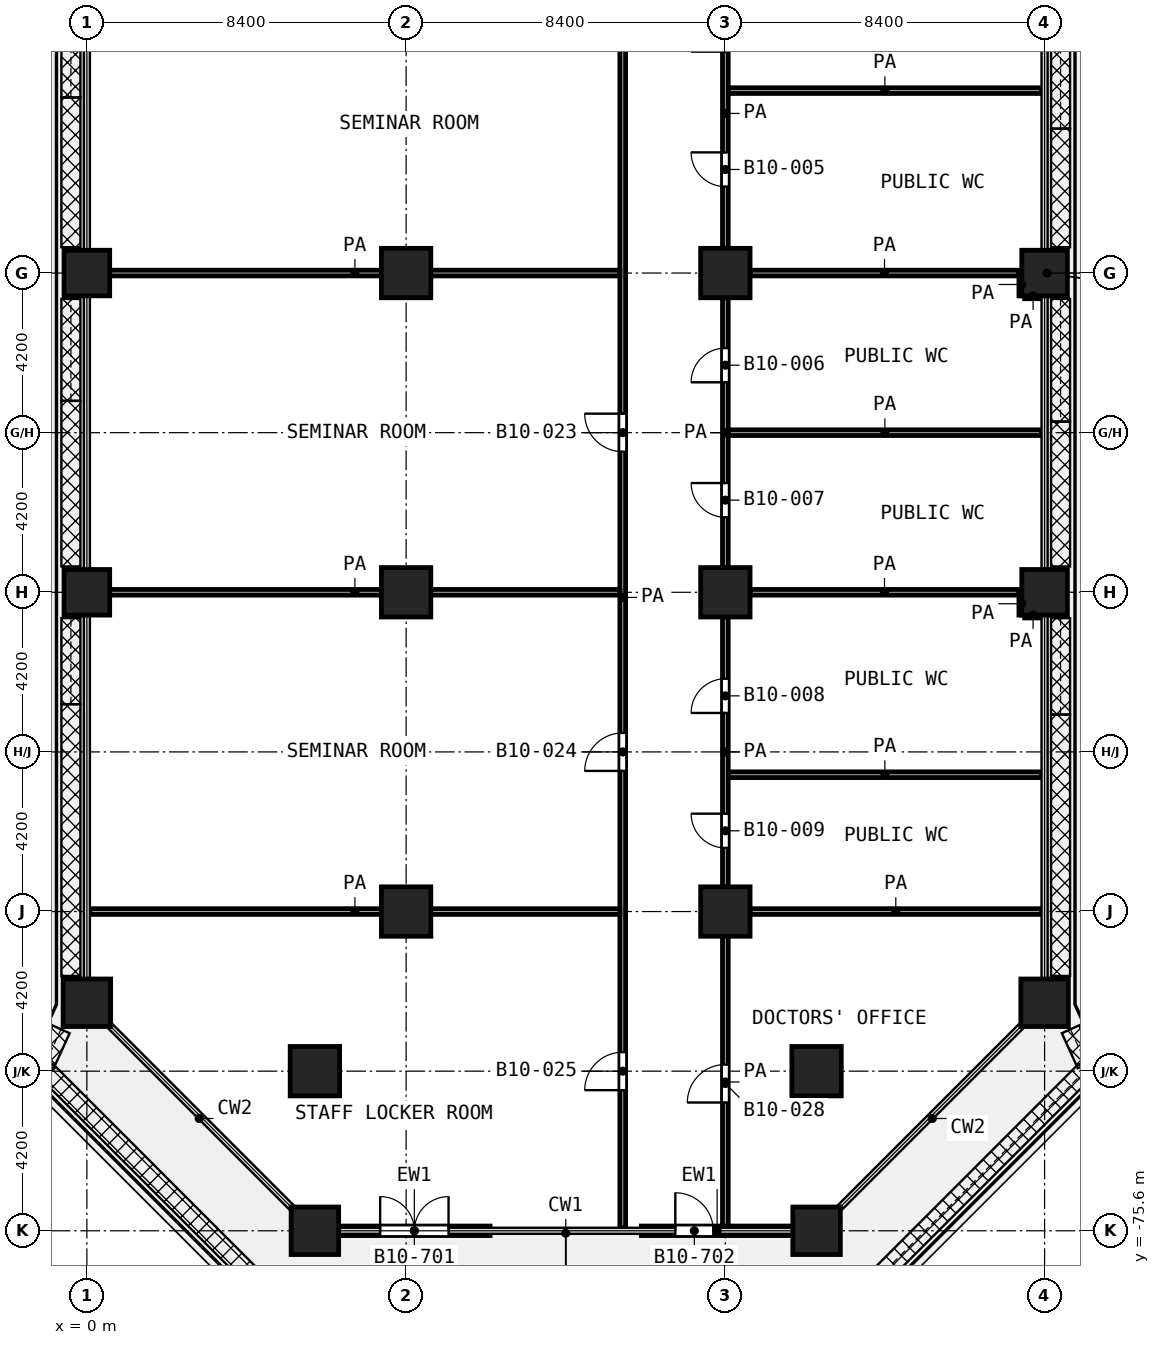
"""IFC4 building model, lengths in metres.
Left out: names, types, materials, properties, quantities, classifications, styles, units other than length and angle.
Written with IfcOpenShell. Run it as: python <this file> out.ifc"""

import sys

from ifc_helpers import new_model, si_unit, direction, frame, frame_2d, origin, origin_2d, place, context, subcontext, project, spatial, rectangle, extrude, element, fill, save


model = new_model("IFC4")
c1 = context("Model", 3, precision=1e-05, world=origin(), true_north=direction((0.0, 1.0)))
c2 = subcontext(c1, "Body", "Model", "MODEL_VIEW")
j1 = project(units=[si_unit("LENGTHUNIT", "METRE"), si_unit("PLANEANGLEUNIT", "RADIAN")], contexts=[c1])
p1 = place(None, origin())
s1 = spatial("IfcSite", under=j1, at=p1, CompositionType="ELEMENT")
p2 = place(p1, origin())
s2 = spatial("IfcBuilding", under=s1, at=p2, CompositionType="ELEMENT")
p3 = place(p2, frame((0.0, 0.0, 47.6)))
s3 = spatial("IfcBuildingStorey", under=s2, at=p3, CompositionType="ELEMENT", Elevation=47.6)
p4 = place(p3, frame((0.0, -50.4, 0.0), z_axis=(0.0, 0.0, 1.0), x_axis=(1.0, 0.0, 0.0)))
e1 = element("IfcColumn", 1, at=p4, inside=s3, PredefinedType="COLUMN", context=c2, shape_type="SweptSolid", body=[
    extrude(rectangle(XDim=1.2, YDim=1.2, at=origin_2d()), origin(), (0.0, 0.0, 1.0), 4.2),
])
for number, where, z_axis, x_axis in (
    (2, (8.4, -50.4, 0.0), (0.0, 0.0, 1.0), (1.0, 0.0, 0.0)),
    (3, (16.8, -50.4, 0.0), (0.0, 0.0, 1.0), (1.0, 0.0, 0.0)),
):
    element("IfcColumn", number, at=place(p3, frame(where, z_axis=z_axis, x_axis=x_axis)), inside=s3, PredefinedType="COLUMN", context=c2, shape_type="SweptSolid", body=[
        extrude(rectangle(XDim=1.3, YDim=1.3, at=origin_2d()), origin(), (0.0, 0.0, 1.0), 4.2),
    ])
for number, where, z_axis, x_axis in (
    (4, (25.2, -50.4, 0.0), (0.0, 0.0, 1.0), (1.0, 0.0, 0.0)),
    (5, (0.0, -58.8, 0.0), (0.0, 0.0, 1.0), (1.0, 0.0, 0.0)),
):
    element("IfcColumn", number, at=place(p3, frame(where, z_axis=z_axis, x_axis=x_axis)), inside=s3, PredefinedType="COLUMN", context=c2, shape_type="SweptSolid", body=[
        extrude(rectangle(XDim=1.2, YDim=1.2, at=origin_2d()), origin(), (0.0, 0.0, 1.0), 4.2),
    ])
for number, where, z_axis, x_axis in (
    (6, (8.4, -58.8, 0.0), (0.0, 0.0, 1.0), (1.0, 0.0, 0.0)),
    (7, (16.8, -58.8, 0.0), (0.0, 0.0, 1.0), (1.0, 0.0, 0.0)),
):
    element("IfcColumn", number, at=place(p3, frame(where, z_axis=z_axis, x_axis=x_axis)), inside=s3, PredefinedType="COLUMN", context=c2, shape_type="SweptSolid", body=[
        extrude(rectangle(XDim=1.3, YDim=1.3, at=origin_2d()), origin(), (0.0, 0.0, 1.0), 4.2),
    ])
p5 = place(p3, frame((25.2, -58.8, 0.0), z_axis=(0.0, 0.0, 1.0), x_axis=(1.0, 0.0, 0.0)))
e8 = element("IfcColumn", 8, at=p5, inside=s3, PredefinedType="COLUMN", context=c2, shape_type="SweptSolid", body=[
    extrude(rectangle(XDim=1.2, YDim=1.2, at=origin_2d()), origin(), (0.0, 0.0, 1.0), 4.2),
])
for number, where, z_axis, x_axis in (
    (9, (8.4, -67.2, 0.0), (0.0, 0.0, 1.0), (1.0, 0.0, 0.0)),
    (10, (16.8, -67.2, 0.0), (0.0, 0.0, 1.0), (1.0, 0.0, 0.0)),
):
    element("IfcColumn", number, at=place(p3, frame(where, z_axis=z_axis, x_axis=x_axis)), inside=s3, PredefinedType="COLUMN", context=c2, shape_type="SweptSolid", body=[
        extrude(rectangle(XDim=1.3, YDim=1.3, at=origin_2d()), origin(), (0.0, 0.0, 1.0), 4.2),
    ])
for number, where, z_axis, x_axis in (
    (11, (0.0, -69.6, 0.0), (0.0, 0.0, 1.0), (1.0, 0.0, 0.0)),
    (12, (25.2, -69.6, 0.0), (0.0, 0.0, 1.0), (1.0, 0.0, 0.0)),
):
    element("IfcColumn", number, at=place(p3, frame(where, z_axis=z_axis, x_axis=x_axis)), inside=s3, PredefinedType="COLUMN", context=c2, shape_type="SweptSolid", body=[
        extrude(rectangle(XDim=1.25, YDim=1.25, at=origin_2d()), origin(), (0.0, 0.0, 1.0), 4.2),
    ])
for number, where, z_axis, x_axis in (
    (13, (6.0, -71.4, 0.0), (0.0, 0.0, 1.0), (1.0, 0.0, 0.0)),
    (14, (19.2, -71.4, 0.0), (0.0, 0.0, 1.0), (1.0, 0.0, 0.0)),
):
    element("IfcColumn", number, at=place(p3, frame(where, z_axis=z_axis, x_axis=x_axis)), inside=s3, PredefinedType="COLUMN", context=c2, shape_type="SweptSolid", body=[
        extrude(rectangle(XDim=1.3, YDim=1.3, at=origin_2d()), origin(), (0.0, 0.0, 1.0), 4.2),
    ])
for number, where, z_axis, x_axis in (
    (15, (6.0, -75.6, 0.0), (0.0, 0.0, 1.0), (1.0, 0.0, 0.0)),
    (16, (19.2, -75.6, 0.0), (0.0, 0.0, 1.0), (1.0, 0.0, 0.0)),
):
    element("IfcColumn", number, at=place(p3, frame(where, z_axis=z_axis, x_axis=x_axis)), inside=s3, PredefinedType="COLUMN", context=c2, shape_type="SweptSolid", body=[
        extrude(rectangle(XDim=1.25, YDim=1.25, at=origin_2d()), origin(), (0.0, 0.0, 1.0), 4.2),
    ])
p6 = place(p3, frame((6.625, -75.6, 0.0), z_axis=(0.0, 0.0, 1.0), x_axis=(1.0, 0.0, 0.0)))
e17 = element("IfcWall", 17, at=p6, inside=s3, PredefinedType="SOLIDWALL", context=c2, shape_type="SweptSolid", body=[
    extrude(rectangle(XDim=3.983, YDim=0.25, at=frame_2d((1.992, 0.0))), origin(), (0.0, 0.0, 1.0), 3.66),
])
p7 = place(p6, frame((1.092, 0.0, 0.0)))
e18 = element("IfcOpeningElement", 18, at=p7, cuts=e17, PredefinedType="OPENING", context=c2, shape_type="SweptSolid", body=[
    extrude(rectangle(XDim=1.8, YDim=2.1, at=frame_2d((0.9, 1.05))), frame((0.0, 0.135, 0.0), z_axis=(0.0, -1.0, 0.0), x_axis=(1.0, 0.0, 0.0)), (0.0, 0.0, 1.0), 0.27),
])
p8 = place(p3, frame((14.592, -75.6, 0.0), z_axis=(0.0, 0.0, 1.0), x_axis=(1.0, 0.0, 0.0)))
e19 = element("IfcWall", 19, at=p8, inside=s3, PredefinedType="SOLIDWALL", context=c2, shape_type="SweptSolid", body=[
    extrude(rectangle(XDim=3.983, YDim=0.25, at=frame_2d((1.992, 0.0))), origin(), (0.0, 0.0, 1.0), 3.66),
])
p9 = place(p8, frame((0.892, 0.0, 0.0)))
e20 = element("IfcOpeningElement", 20, at=p9, cuts=e19, PredefinedType="OPENING", context=c2, shape_type="SweptSolid", body=[
    extrude(rectangle(XDim=1.0, YDim=2.1, at=frame_2d((0.5, 1.05))), frame((0.0, 0.135, 0.0), z_axis=(0.0, -1.0, 0.0), x_axis=(1.0, 0.0, 0.0)), (0.0, 0.0, 1.0), 0.27),
])
p10 = place(p3, frame((0.08, -67.2, 0.0), z_axis=(0.0, 0.0, 1.0), x_axis=(1.0, 0.0, 0.0)))
e21 = element("IfcWall", 21, at=p10, inside=s3, PredefinedType="PARTITIONING", context=c2, shape_type="SweptSolid", body=[
    extrude(rectangle(XDim=13.945, YDim=0.15, at=frame_2d((6.972, 0.0))), origin(), (0.0, 0.0, 1.0), 3.78),
])
p11 = place(p3, frame((17.45, -67.2, 0.0), z_axis=(0.0, 0.0, 1.0), x_axis=(1.0, 0.0, 0.0)))
e22 = element("IfcWall", 22, at=p11, inside=s3, PredefinedType="PARTITIONING", context=c2, shape_type="SweptSolid", body=[
    extrude(rectangle(XDim=7.67, YDim=0.15, at=frame_2d((3.835, 0.0))), origin(), (0.0, 0.0, 1.0), 3.78),
])
p12 = place(p3, frame((16.875, -63.6, 0.0), z_axis=(0.0, 0.0, 1.0), x_axis=(1.0, 0.0, 0.0)))
e23 = element("IfcWall", 23, at=p12, inside=s3, PredefinedType="PARTITIONING", context=c2, shape_type="SweptSolid", body=[
    extrude(rectangle(XDim=8.245, YDim=0.15, at=frame_2d((4.123, 0.0))), origin(), (0.0, 0.0, 1.0), 3.78),
])
p13 = place(p3, frame((24.675, -59.4, 0.0), z_axis=(0.0, 0.0, 1.0), x_axis=(1.0, 0.0, 0.0)))
e24 = element("IfcWall", 24, at=p13, inside=s3, PredefinedType="PARTITIONING", context=c2, shape_type="SweptSolid", body=[
    extrude(rectangle(XDim=0.445, YDim=0.15, at=frame_2d((0.223, 0.0))), origin(), (0.0, 0.0, 1.0), 3.78),
])
p14 = place(p3, frame((0.08, -58.8, 0.0), z_axis=(0.0, 0.0, 1.0), x_axis=(1.0, 0.0, 0.0)))
e25 = element("IfcWall", 25, at=p14, inside=s3, PredefinedType="PARTITIONING", context=c2, shape_type="SweptSolid", body=[
    extrude(rectangle(XDim=13.945, YDim=0.15, at=frame_2d((6.972, 0.0))), origin(), (0.0, 0.0, 1.0), 3.78),
])
p15 = place(p3, frame((17.452, -58.8, 0.0), z_axis=(0.0, 0.0, 1.0), x_axis=(1.0, 0.0, 0.0)))
e26 = element("IfcWall", 26, at=p15, inside=s3, PredefinedType="PARTITIONING", context=c2, shape_type="SweptSolid", body=[
    extrude(rectangle(XDim=7.071, YDim=0.15, at=frame_2d((3.536, 0.0))), origin(), (0.0, 0.0, 1.0), 3.78),
])
p16 = place(p3, frame((16.875, -54.6, 0.0), z_axis=(0.0, 0.0, 1.0), x_axis=(1.0, 0.0, 0.0)))
e27 = element("IfcWall", 27, at=p16, inside=s3, PredefinedType="PARTITIONING", context=c2, shape_type="SweptSolid", body=[
    extrude(rectangle(XDim=8.245, YDim=0.15, at=frame_2d((4.123, 0.0))), origin(), (0.0, 0.0, 1.0), 3.78),
])
p17 = place(p3, frame((24.675, -51.0, 0.0), z_axis=(0.0, 0.0, 1.0), x_axis=(1.0, 0.0, 0.0)))
e28 = element("IfcWall", 28, at=p17, inside=s3, PredefinedType="PARTITIONING", context=c2, shape_type="SweptSolid", body=[
    extrude(rectangle(XDim=0.445, YDim=0.15, at=frame_2d((0.223, 0.0))), origin(), (0.0, 0.0, 1.0), 3.78),
])
p18 = place(p3, frame((0.08, -50.4, 0.0), z_axis=(0.0, 0.0, 1.0), x_axis=(1.0, 0.0, 0.0)))
e29 = element("IfcWall", 29, at=p18, inside=s3, PredefinedType="PARTITIONING", context=c2, shape_type="SweptSolid", body=[
    extrude(rectangle(XDim=13.945, YDim=0.15, at=frame_2d((6.972, 0.0))), origin(), (0.0, 0.0, 1.0), 3.78),
])
p19 = place(p3, frame((17.452, -50.4, 0.0), z_axis=(0.0, 0.0, 1.0), x_axis=(1.0, 0.0, 0.0)))
e30 = element("IfcWall", 30, at=p19, inside=s3, PredefinedType="PARTITIONING", context=c2, shape_type="SweptSolid", body=[
    extrude(rectangle(XDim=7.071, YDim=0.15, at=frame_2d((3.536, 0.0))), origin(), (0.0, 0.0, 1.0), 3.78),
])
p20 = place(p3, frame((16.875, -45.6, 0.0), z_axis=(0.0, 0.0, 1.0), x_axis=(1.0, 0.0, 0.0)))
e31 = element("IfcWall", 31, at=p20, inside=s3, PredefinedType="PARTITIONING", context=c2, shape_type="SweptSolid", body=[
    extrude(rectangle(XDim=8.245, YDim=0.15, at=frame_2d((4.123, 0.0))), origin(), (0.0, 0.0, 1.0), 3.78),
])
p21 = place(p3, frame((14.1, -75.52, 0.0), z_axis=(0.0, 0.0, 1.0), x_axis=(0.0, 1.0, 0.0)))
e32 = element("IfcWall", 32, at=p21, inside=s3, PredefinedType="PARTITIONING", context=c2, shape_type="SweptSolid", body=[
    extrude(rectangle(XDim=33.17, YDim=0.15, at=frame_2d((16.585, 0.0))), origin(), (0.0, 0.0, 1.0), 3.78),
])
p22 = place(p21, frame((20.42, 0.0, 0.0)))
e33 = element("IfcOpeningElement", 33, at=p22, cuts=e32, PredefinedType="OPENING", context=c2, shape_type="SweptSolid", body=[
    extrude(rectangle(XDim=1.0, YDim=2.1, at=frame_2d((0.5, 1.05))), frame((0.0, 0.085, 0.0), z_axis=(0.0, -1.0, 0.0), x_axis=(1.0, 0.0, 0.0)), (0.0, 0.0, 1.0), 0.17),
])
p23 = place(p21, frame((12.02, 0.0, 0.0)))
e34 = element("IfcOpeningElement", 34, at=p23, cuts=e32, PredefinedType="OPENING", context=c2, shape_type="SweptSolid", body=[
    extrude(rectangle(XDim=1.0, YDim=2.1, at=frame_2d((0.5, 1.05))), frame((0.0, 0.085, 0.0), z_axis=(0.0, -1.0, 0.0), x_axis=(1.0, 0.0, 0.0)), (0.0, 0.0, 1.0), 0.17),
])
p24 = place(p21, frame((3.62, 0.0, 0.0)))
e35 = element("IfcOpeningElement", 35, at=p24, cuts=e32, PredefinedType="OPENING", context=c2, shape_type="SweptSolid", body=[
    extrude(rectangle(XDim=1.0, YDim=2.1, at=frame_2d((0.5, 1.05))), frame((0.0, 0.085, 0.0), z_axis=(0.0, -1.0, 0.0), x_axis=(1.0, 0.0, 0.0)), (0.0, 0.0, 1.0), 0.17),
])
p25 = place(p3, frame((16.8, -75.52, 0.0), z_axis=(0.0, 0.0, 1.0), x_axis=(0.0, 1.0, 0.0)))
e36 = element("IfcWall", 36, at=p25, inside=s3, PredefinedType="PARTITIONING", context=c2, shape_type="SweptSolid", body=[
    extrude(rectangle(XDim=7.67, YDim=0.15, at=frame_2d((3.835, 0.0))), origin(), (0.0, 0.0, 1.0), 3.78),
])
p26 = place(p25, frame((3.295, 0.0, 0.0)))
e37 = element("IfcOpeningElement", 37, at=p26, cuts=e36, PredefinedType="OPENING", context=c2, shape_type="SweptSolid", body=[
    extrude(rectangle(XDim=1.0, YDim=2.1, at=frame_2d((0.5, 1.05))), frame((0.0, 0.085, 0.0), z_axis=(0.0, -1.0, 0.0), x_axis=(1.0, 0.0, 0.0)), (0.0, 0.0, 1.0), 0.17),
])
p27 = place(p3, frame((16.8, -66.55, 0.0), z_axis=(0.0, 0.0, 1.0), x_axis=(0.0, 1.0, 0.0)))
e38 = element("IfcWall", 38, at=p27, inside=s3, PredefinedType="PARTITIONING", context=c2, shape_type="SweptSolid", body=[
    extrude(rectangle(XDim=7.1, YDim=0.15, at=frame_2d((3.55, 0.0))), origin(), (0.0, 0.0, 1.0), 3.78),
])
p28 = place(p27, frame((4.575, 0.0, 0.0)))
e39 = element("IfcOpeningElement", 39, at=p28, cuts=e38, PredefinedType="OPENING", context=c2, shape_type="SweptSolid", body=[
    extrude(rectangle(XDim=0.9, YDim=2.1, at=frame_2d((0.45, 1.05))), frame((0.0, 0.085, 0.0), z_axis=(0.0, -1.0, 0.0), x_axis=(1.0, 0.0, 0.0)), (0.0, 0.0, 1.0), 0.17),
])
p29 = place(p27, frame((1.025, 0.0, 0.0)))
e40 = element("IfcOpeningElement", 40, at=p29, cuts=e38, PredefinedType="OPENING", context=c2, shape_type="SweptSolid", body=[
    extrude(rectangle(XDim=0.9, YDim=2.1, at=frame_2d((0.45, 1.05))), frame((0.0, 0.085, 0.0), z_axis=(0.0, -1.0, 0.0), x_axis=(1.0, 0.0, 0.0)), (0.0, 0.0, 1.0), 0.17),
])
p30 = place(p3, frame((16.8, -58.15, 0.0), z_axis=(0.0, 0.0, 1.0), x_axis=(0.0, 1.0, 0.0)))
e41 = element("IfcWall", 41, at=p30, inside=s3, PredefinedType="PARTITIONING", context=c2, shape_type="SweptSolid", body=[
    extrude(rectangle(XDim=7.1, YDim=0.15, at=frame_2d((3.55, 0.0))), origin(), (0.0, 0.0, 1.0), 3.78),
])
p31 = place(p30, frame((4.875, 0.0, 0.0)))
e42 = element("IfcOpeningElement", 42, at=p31, cuts=e41, PredefinedType="OPENING", context=c2, shape_type="SweptSolid", body=[
    extrude(rectangle(XDim=0.9, YDim=2.1, at=frame_2d((0.45, 1.05))), frame((0.0, 0.085, 0.0), z_axis=(0.0, -1.0, 0.0), x_axis=(1.0, 0.0, 0.0)), (0.0, 0.0, 1.0), 0.17),
])
p32 = place(p30, frame((1.325, 0.0, 0.0)))
e43 = element("IfcOpeningElement", 43, at=p32, cuts=e41, PredefinedType="OPENING", context=c2, shape_type="SweptSolid", body=[
    extrude(rectangle(XDim=0.9, YDim=2.1, at=frame_2d((0.45, 1.05))), frame((0.0, 0.085, 0.0), z_axis=(0.0, -1.0, 0.0), x_axis=(1.0, 0.0, 0.0)), (0.0, 0.0, 1.0), 0.17),
])
p33 = place(p3, frame((16.8, -49.75, 0.0), z_axis=(0.0, 0.0, 1.0), x_axis=(0.0, 1.0, 0.0)))
e44 = element("IfcWall", 44, at=p33, inside=s3, PredefinedType="PARTITIONING", context=c2, shape_type="SweptSolid", body=[
    extrude(rectangle(XDim=7.1, YDim=0.15, at=frame_2d((3.55, 0.0))), origin(), (0.0, 0.0, 1.0), 3.78),
])
p34 = place(p33, frame((5.175, 0.0, 0.0)))
e45 = element("IfcOpeningElement", 45, at=p34, cuts=e44, PredefinedType="OPENING", context=c2, shape_type="SweptSolid", body=[
    extrude(rectangle(XDim=0.9, YDim=2.1, at=frame_2d((0.45, 1.05))), frame((0.0, 0.085, 0.0), z_axis=(0.0, -1.0, 0.0), x_axis=(1.0, 0.0, 0.0)), (0.0, 0.0, 1.0), 0.17),
])
p35 = place(p33, frame((1.625, 0.0, 0.0)))
e46 = element("IfcOpeningElement", 46, at=p35, cuts=e44, PredefinedType="OPENING", context=c2, shape_type="SweptSolid", body=[
    extrude(rectangle(XDim=0.9, YDim=2.1, at=frame_2d((0.45, 1.05))), frame((0.0, 0.085, 0.0), z_axis=(0.0, -1.0, 0.0), x_axis=(1.0, 0.0, 0.0)), (0.0, 0.0, 1.0), 0.17),
])
for number, where, z_axis, x_axis in (
    (47, (24.6, -59.4, 0.0), (0.0, 0.0, 1.0), (0.0, 1.0, 0.0)),
    (48, (24.6, -51.0, 0.0), (0.0, 0.0, 1.0), (0.0, 1.0, 0.0)),
):
    element("IfcWall", number, at=place(p3, frame(where, z_axis=z_axis, x_axis=x_axis)), inside=s3, PredefinedType="PARTITIONING", context=c2, shape_type="SweptSolid", body=[
        extrude(rectangle(XDim=0.598, YDim=0.15, at=frame_2d((0.299, 0.0))), origin(), (0.0, 0.0, 1.0), 3.78),
    ])
p36 = place(p7, origin())
e49 = element("IfcDoor", 49, at=p36, inside=s3, OperationType="DOUBLE_DOOR_SINGLE_SWING", PredefinedType="DOOR", context=c2, shape_type="SweptSolid", body=[
    extrude(rectangle(XDim=1.8, YDim=2.1, at=frame_2d((0.9, 1.05))), frame((0.0, 0.025, 0.0), z_axis=(0.0, -1.0, 0.0), x_axis=(1.0, 0.0, 0.0)), (0.0, 0.0, 1.0), 0.05),
])
fill(e18, e49)
p37 = place(p9, origin())
e50 = element("IfcDoor", 50, at=p37, inside=s3, OperationType="SINGLE_SWING_LEFT", PredefinedType="DOOR", context=c2, shape_type="SweptSolid", body=[
    extrude(rectangle(XDim=1.0, YDim=2.1, at=frame_2d((0.5, 1.05))), frame((0.0, 0.025, 0.0), z_axis=(0.0, -1.0, 0.0), x_axis=(1.0, 0.0, 0.0)), (0.0, 0.0, 1.0), 0.05),
])
fill(e20, e50)
p38 = place(p22, origin())
e51 = element("IfcDoor", 51, at=p38, inside=s3, OperationType="SINGLE_SWING_RIGHT", PredefinedType="DOOR", context=c2, shape_type="SweptSolid", body=[
    extrude(rectangle(XDim=1.0, YDim=2.1, at=frame_2d((0.5, 1.05))), frame((0.0, 0.025, 0.0), z_axis=(0.0, -1.0, 0.0), x_axis=(1.0, 0.0, 0.0)), (0.0, 0.0, 1.0), 0.05),
])
fill(e33, e51)
p39 = place(p23, origin())
e52 = element("IfcDoor", 52, at=p39, inside=s3, OperationType="SINGLE_SWING_LEFT", PredefinedType="DOOR", context=c2, shape_type="SweptSolid", body=[
    extrude(rectangle(XDim=1.0, YDim=2.1, at=frame_2d((0.5, 1.05))), frame((0.0, 0.025, 0.0), z_axis=(0.0, -1.0, 0.0), x_axis=(1.0, 0.0, 0.0)), (0.0, 0.0, 1.0), 0.05),
])
fill(e34, e52)
p40 = place(p24, origin())
e53 = element("IfcDoor", 53, at=p40, inside=s3, OperationType="SINGLE_SWING_LEFT", PredefinedType="DOOR", context=c2, shape_type="SweptSolid", body=[
    extrude(rectangle(XDim=1.0, YDim=2.1, at=frame_2d((0.5, 1.05))), frame((0.0, 0.025, 0.0), z_axis=(0.0, -1.0, 0.0), x_axis=(1.0, 0.0, 0.0)), (0.0, 0.0, 1.0), 0.05),
])
fill(e35, e53)
p41 = place(p35, origin())
e54 = element("IfcDoor", 54, at=p41, inside=s3, OperationType="SINGLE_SWING_RIGHT", PredefinedType="DOOR", context=c2, shape_type="SweptSolid", body=[
    extrude(rectangle(XDim=0.9, YDim=2.1, at=frame_2d((0.45, 1.05))), frame((0.0, 0.025, 0.0), z_axis=(0.0, -1.0, 0.0), x_axis=(1.0, 0.0, 0.0)), (0.0, 0.0, 1.0), 0.05),
])
fill(e46, e54)
p42 = place(p31, origin())
e55 = element("IfcDoor", 55, at=p42, inside=s3, OperationType="SINGLE_SWING_LEFT", PredefinedType="DOOR", context=c2, shape_type="SweptSolid", body=[
    extrude(rectangle(XDim=0.9, YDim=2.1, at=frame_2d((0.45, 1.05))), frame((0.0, 0.025, 0.0), z_axis=(0.0, -1.0, 0.0), x_axis=(1.0, 0.0, 0.0)), (0.0, 0.0, 1.0), 0.05),
])
fill(e42, e55)
p43 = place(p32, origin())
e56 = element("IfcDoor", 56, at=p43, inside=s3, OperationType="SINGLE_SWING_RIGHT", PredefinedType="DOOR", context=c2, shape_type="SweptSolid", body=[
    extrude(rectangle(XDim=0.9, YDim=2.1, at=frame_2d((0.45, 1.05))), frame((0.0, 0.025, 0.0), z_axis=(0.0, -1.0, 0.0), x_axis=(1.0, 0.0, 0.0)), (0.0, 0.0, 1.0), 0.05),
])
fill(e43, e56)
p44 = place(p28, origin())
e57 = element("IfcDoor", 57, at=p44, inside=s3, OperationType="SINGLE_SWING_LEFT", PredefinedType="DOOR", context=c2, shape_type="SweptSolid", body=[
    extrude(rectangle(XDim=0.9, YDim=2.1, at=frame_2d((0.45, 1.05))), frame((0.0, 0.025, 0.0), z_axis=(0.0, -1.0, 0.0), x_axis=(1.0, 0.0, 0.0)), (0.0, 0.0, 1.0), 0.05),
])
fill(e39, e57)
p45 = place(p29, origin())
e58 = element("IfcDoor", 58, at=p45, inside=s3, OperationType="SINGLE_SWING_RIGHT", PredefinedType="DOOR", context=c2, shape_type="SweptSolid", body=[
    extrude(rectangle(XDim=0.9, YDim=2.1, at=frame_2d((0.45, 1.05))), frame((0.0, 0.025, 0.0), z_axis=(0.0, -1.0, 0.0), x_axis=(1.0, 0.0, 0.0)), (0.0, 0.0, 1.0), 0.05),
])
fill(e40, e58)
p46 = place(p26, origin())
e59 = element("IfcDoor", 59, at=p46, inside=s3, OperationType="SINGLE_SWING_LEFT", PredefinedType="DOOR", context=c2, shape_type="SweptSolid", body=[
    extrude(rectangle(XDim=1.0, YDim=2.1, at=frame_2d((0.5, 1.05))), frame((0.0, 0.025, 0.0), z_axis=(0.0, -1.0, 0.0), x_axis=(1.0, 0.0, 0.0)), (0.0, 0.0, 1.0), 0.05),
])
fill(e37, e59)
save(model, sys.argv[1])
